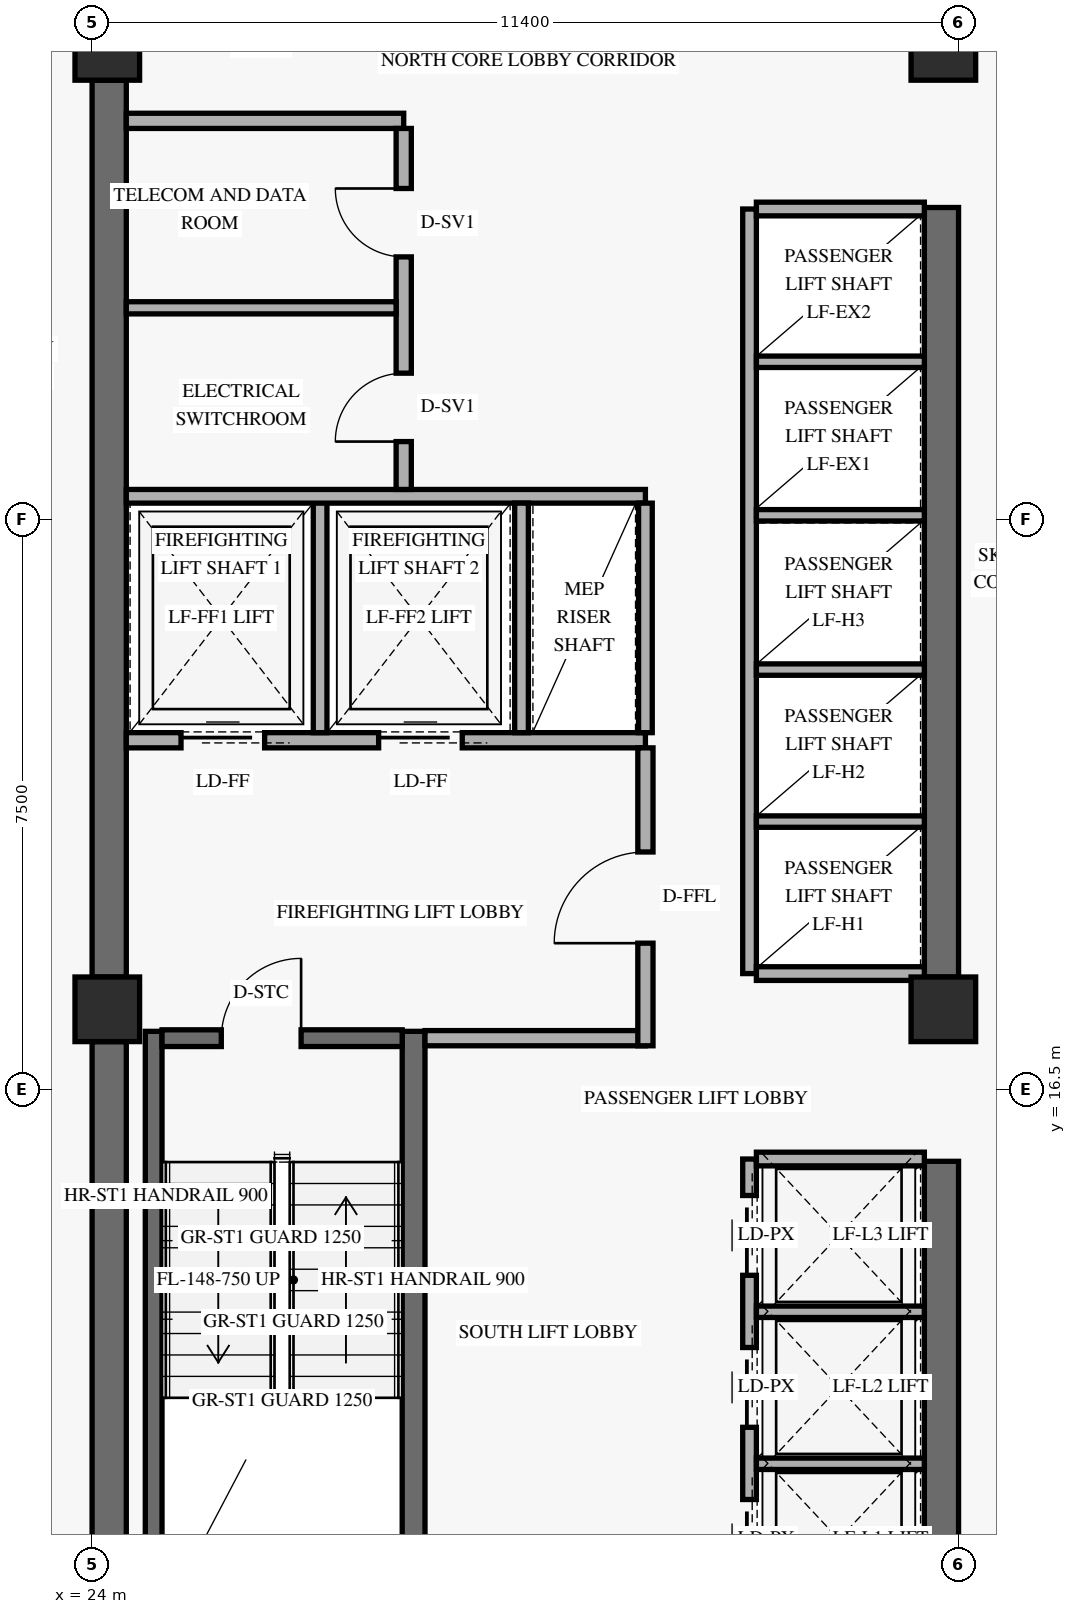
"""IFC4 building model, lengths in metres.
Left out: names, types, materials, properties, quantities, classifications, styles, units other than length and angle.
Written with IfcOpenShell. Run it as: python <this file> out.ifc"""

import sys

from ifc_helpers import new_model, si_unit, direction, frame, frame_2d, origin, origin_2d, place, context, subcontext, project, spatial, rectangle, extrude, element, fill, save


model = new_model("IFC4")
c1 = context("Model", 3, precision=1e-05, world=origin(), true_north=direction((0.0, 1.0)))
c2 = subcontext(c1, "Body", "Model", "MODEL_VIEW")
j1 = project(units=[si_unit("LENGTHUNIT", "METRE"), si_unit("PLANEANGLEUNIT", "RADIAN")], contexts=[c1])
p1 = place(None, origin())
s1 = spatial("IfcSite", under=j1, at=p1, CompositionType="ELEMENT")
p2 = place(p1, origin())
s2 = spatial("IfcBuilding", under=s1, at=p2, CompositionType="ELEMENT")
p3 = place(p2, frame((0.0, 0.0, 98.4)))
s3 = spatial("IfcBuildingStorey", under=s2, at=p3, CompositionType="ELEMENT", Elevation=98.4)
p4 = place(p3, frame((24.225, 9.675, 0.0), z_axis=(0.0, 0.0, 1.0), x_axis=(0.0, 1.0, 0.0)))
e1 = element("IfcWall", 1, at=p4, inside=s3, PredefinedType="SHEAR", context=c2, shape_type="SweptSolid", body=[
    extrude(rectangle(XDim=7.45, YDim=0.45, at=frame_2d((3.725, 0.0))), origin(), (0.0, 0.0, 1.0), 3.349),
])
p5 = place(p3, frame((24.225, 17.975, 0.0), z_axis=(0.0, 0.0, 1.0), x_axis=(0.0, 1.0, 0.0)))
e2 = element("IfcWall", 2, at=p5, inside=s3, PredefinedType="SHEAR", context=c2, shape_type="SweptSolid", body=[
    extrude(rectangle(XDim=11.8, YDim=0.45, at=frame_2d((5.9, 0.0))), origin(), (0.0, 0.0, 1.0), 3.349),
])
p6 = place(p3, frame((35.175, 9.675, 0.0), z_axis=(0.0, 0.0, 1.0), x_axis=(0.0, 1.0, 0.0)))
e3 = element("IfcWall", 3, at=p6, inside=s3, PredefinedType="SHEAR", context=c2, shape_type="SweptSolid", body=[
    extrude(rectangle(XDim=5.875, YDim=0.45, at=frame_2d((2.938, 0.0))), origin(), (0.0, 0.0, 1.0), 3.349),
])
p7 = place(p3, frame((35.175, 17.975, 0.0), z_axis=(0.0, 0.0, 1.0), x_axis=(0.0, 1.0, 0.0)))
e4 = element("IfcWall", 4, at=p7, inside=s3, PredefinedType="SHEAR", context=c2, shape_type="SweptSolid", body=[
    extrude(rectangle(XDim=10.125, YDim=0.45, at=frame_2d((5.062, 0.0))), origin(), (0.0, 0.0, 1.0), 3.349),
])
p8 = place(p3, frame((24.81, 9.5, 0.0), z_axis=(0.0, 0.0, 1.0), x_axis=(0.0, 1.0, 0.0)))
e5 = element("IfcWall", 5, at=p8, inside=s3, PredefinedType="SHEAR", context=c2, shape_type="SweptSolid", body=[
    extrude(rectangle(XDim=7.76, YDim=0.22, at=frame_2d((3.88, 0.0))), origin(), (0.0, 0.0, 1.0), 3.96),
])
p9 = place(p3, frame((28.23, 9.5, 0.0), z_axis=(0.0, 0.0, 1.0), x_axis=(0.0, 1.0, 0.0)))
e6 = element("IfcWall", 6, at=p9, inside=s3, PredefinedType="SHEAR", context=c2, shape_type="SweptSolid", body=[
    extrude(rectangle(XDim=7.76, YDim=0.3, at=frame_2d((3.88, 0.0))), origin(), (0.0, 0.0, 1.0), 3.96),
])
p10 = place(p3, frame((24.92, 17.17, 0.0), z_axis=(0.0, 0.0, 1.0), x_axis=(1.0, 0.0, 0.0)))
e7 = element("IfcWall", 7, at=p10, inside=s3, PredefinedType="SHEAR", context=c2, shape_type="SweptSolid", body=[
    extrude(rectangle(XDim=3.16, YDim=0.22, at=frame_2d((1.58, 0.0))), origin(), (0.0, 0.0, 1.0), 3.96),
])
p11 = place(p10, frame((0.78, 0.0, 0.0)))
e8 = element("IfcOpeningElement", 8, at=p11, cuts=e7, PredefinedType="OPENING", context=c2, shape_type="SweptSolid", body=[
    extrude(rectangle(XDim=1.05, YDim=2.15, at=frame_2d((0.525, 1.075))), frame((0.0, 0.12, 0.0), z_axis=(0.0, -1.0, 0.0), x_axis=(1.0, 0.0, 0.0)), (0.0, 0.0, 1.0), 0.24),
])
for number, where, z_axis, x_axis in (
    (9, (24.2, 17.55, 0.0), (0.0, 0.0, 1.0), (1.0, 0.0, 0.0)),
    (10, (24.2, 30.2, 0.0), (0.0, 0.0, 1.0), (1.0, 0.0, 0.0)),
    (11, (35.2, 17.55, 0.0), (0.0, 0.0, 1.0), (1.0, 0.0, 0.0)),
    (12, (35.2, 30.2, 0.0), (0.0, 0.0, 1.0), (1.0, 0.0, 0.0)),
):
    element("IfcColumn", number, at=place(p3, frame(where, z_axis=z_axis, x_axis=x_axis)), inside=s3, PredefinedType="COLUMN", context=c2, shape_type="SweptSolid", body=[
        extrude(rectangle(XDim=0.85, YDim=0.85, at=origin_2d()), origin(), (0.0, 0.0, 1.0), 4.2),
    ])
p12 = place(p3, frame((24.45, 21.09, 0.0), z_axis=(0.0, 0.0, 1.0), x_axis=(1.0, 0.0, 0.0)))
e13 = element("IfcWall", 13, at=p12, inside=s3, PredefinedType="STANDARD", context=c2, shape_type="SweptSolid", body=[
    extrude(rectangle(XDim=6.83, YDim=0.2, at=frame_2d((3.415, 0.0))), origin(), (0.0, 0.0, 1.0), 3.96),
])
p13 = place(p12, frame((0.72, 0.0, 0.0)))
e14 = element("IfcOpeningElement", 14, at=p13, cuts=e13, PredefinedType="OPENING", context=c2, shape_type="SweptSolid", body=[
    extrude(rectangle(XDim=1.1, YDim=2.2, at=frame_2d((0.55, 1.1))), frame((0.0, 0.11, 0.0), z_axis=(0.0, -1.0, 0.0), x_axis=(1.0, 0.0, 0.0)), (0.0, 0.0, 1.0), 0.22),
])
p14 = place(p12, frame((3.32, 0.0, 0.0)))
e15 = element("IfcOpeningElement", 15, at=p14, cuts=e13, PredefinedType="OPENING", context=c2, shape_type="SweptSolid", body=[
    extrude(rectangle(XDim=1.1, YDim=2.2, at=frame_2d((0.55, 1.1))), frame((0.0, 0.11, 0.0), z_axis=(0.0, -1.0, 0.0), x_axis=(1.0, 0.0, 0.0)), (0.0, 0.0, 1.0), 0.22),
])
p15 = place(p3, frame((28.38, 17.17, 0.0), z_axis=(0.0, 0.0, 1.0), x_axis=(1.0, 0.0, 0.0)))
e16 = element("IfcWall", 16, at=p15, inside=s3, PredefinedType="STANDARD", context=c2, shape_type="SweptSolid", body=[
    extrude(rectangle(XDim=2.9, YDim=0.2, at=frame_2d((1.45, 0.0))), origin(), (0.0, 0.0, 1.0), 3.96),
])
p16 = place(p3, frame((31.28, 17.07, 0.0), z_axis=(0.0, 0.0, 1.0), x_axis=(0.0, 1.0, 0.0)))
e17 = element("IfcWall", 17, at=p16, inside=s3, PredefinedType="STANDARD", context=c2, shape_type="SweptSolid", body=[
    extrude(rectangle(XDim=3.92, YDim=0.2, at=frame_2d((1.96, 0.0))), origin(), (0.0, 0.0, 1.0), 3.331),
])
p17 = place(p16, frame((1.35, 0.0, 0.0)))
e18 = element("IfcOpeningElement", 18, at=p17, cuts=e17, PredefinedType="OPENING", context=c2, shape_type="SweptSolid", body=[
    extrude(rectangle(XDim=1.2, YDim=2.15, at=frame_2d((0.6, 1.075))), frame((0.0, 0.11, 0.0), z_axis=(0.0, -1.0, 0.0), x_axis=(1.0, 0.0, 0.0)), (0.0, 0.0, 1.0), 0.22),
])
p18 = place(p3, frame((27.0, 21.19, 0.0), z_axis=(0.0, 0.0, 1.0), x_axis=(0.0, 1.0, 0.0)))
e19 = element("IfcWall", 19, at=p18, inside=s3, PredefinedType="STANDARD", context=c2, shape_type="SweptSolid", body=[
    extrude(rectangle(XDim=3.11, YDim=0.18, at=frame_2d((1.555, 0.0))), origin(), (0.0, 0.0, 1.0), 3.96),
])
p19 = place(p3, frame((24.45, 24.3, 0.0), z_axis=(0.0, 0.0, 1.0), x_axis=(1.0, 0.0, 0.0)))
e20 = element("IfcWall", 20, at=p19, inside=s3, PredefinedType="STANDARD", context=c2, shape_type="SweptSolid", body=[
    extrude(rectangle(XDim=6.83, YDim=0.18, at=frame_2d((3.415, 0.0))), origin(), (0.0, 0.0, 1.0), 3.96),
])
for number, where, z_axis, x_axis in (
    (21, (29.65, 21.19, 0.0), (0.0, 0.0, 1.0), (0.0, 1.0, 0.0)),
    (22, (31.28, 21.19, 0.0), (0.0, 0.0, 1.0), (0.0, 1.0, 0.0)),
):
    element("IfcWall", number, at=place(p3, frame(where, z_axis=z_axis, x_axis=x_axis)), inside=s3, PredefinedType="STANDARD", context=c2, shape_type="SweptSolid", body=[
        extrude(rectangle(XDim=3.02, YDim=0.18, at=frame_2d((1.51, 0.0))), origin(), (0.0, 0.0, 1.0), 3.96),
    ])
p20 = place(p3, frame((24.45, 29.24, 0.0), z_axis=(0.0, 0.0, 1.0), x_axis=(1.0, 0.0, 0.0)))
e23 = element("IfcWall", 23, at=p20, inside=s3, PredefinedType="STANDARD", context=c2, shape_type="SweptSolid", body=[
    extrude(rectangle(XDim=3.65, YDim=0.2, at=frame_2d((1.825, 0.0))), origin(), (0.0, 0.0, 1.0), 3.96),
])
p21 = place(p3, frame((28.1, 24.39, 0.0), z_axis=(0.0, 0.0, 1.0), x_axis=(0.0, 1.0, 0.0)))
e24 = element("IfcWall", 24, at=p21, inside=s3, PredefinedType="STANDARD", context=c2, shape_type="SweptSolid", body=[
    extrude(rectangle(XDim=4.75, YDim=0.2, at=frame_2d((2.375, 0.0))), origin(), (0.0, 0.0, 1.0), 3.96),
])
p22 = place(p21, frame((0.63, 0.0, 0.0)))
e25 = element("IfcOpeningElement", 25, at=p22, cuts=e24, PredefinedType="OPENING", context=c2, shape_type="SweptSolid", body=[
    extrude(rectangle(XDim=0.9, YDim=2.1, at=frame_2d((0.45, 1.05))), frame((0.0, 0.11, 0.0), z_axis=(0.0, -1.0, 0.0), x_axis=(1.0, 0.0, 0.0)), (0.0, 0.0, 1.0), 0.22),
])
p23 = place(p21, frame((3.06, 0.0, 0.0)))
e26 = element("IfcOpeningElement", 26, at=p23, cuts=e24, PredefinedType="OPENING", context=c2, shape_type="SweptSolid", body=[
    extrude(rectangle(XDim=0.9, YDim=2.1, at=frame_2d((0.45, 1.05))), frame((0.0, 0.11, 0.0), z_axis=(0.0, -1.0, 0.0), x_axis=(1.0, 0.0, 0.0)), (0.0, 0.0, 1.0), 0.22),
])
p24 = place(p3, frame((24.45, 26.78, 0.0), z_axis=(0.0, 0.0, 1.0), x_axis=(1.0, 0.0, 0.0)))
e27 = element("IfcWall", 27, at=p24, inside=s3, PredefinedType="PARTITIONING", context=c2, shape_type="SweptSolid", body=[
    extrude(rectangle(XDim=3.55, YDim=0.16, at=frame_2d((1.775, 0.0))), origin(), (0.0, 0.0, 1.0), 3.96),
])
p25 = place(p3, frame((32.65, 9.5, 0.0), z_axis=(0.0, 0.0, 1.0), x_axis=(0.0, 1.0, 0.0)))
e28 = element("IfcWall", 28, at=p25, inside=s3, PredefinedType="STANDARD", context=c2, shape_type="SweptSolid", body=[
    extrude(rectangle(XDim=6.08, YDim=0.18, at=frame_2d((3.04, 0.0))), origin(), (0.0, 0.0, 1.0), 3.96),
])
p26 = place(p25, frame((0.55, 0.0, 0.0)))
e29 = element("IfcOpeningElement", 29, at=p26, cuts=e28, PredefinedType="OPENING", context=c2, shape_type="SweptSolid", body=[
    extrude(rectangle(XDim=1.05, YDim=2.2, at=frame_2d((0.525, 1.1))), frame((0.0, 0.1, 0.0), z_axis=(0.0, -1.0, 0.0), x_axis=(1.0, 0.0, 0.0)), (0.0, 0.0, 1.0), 0.2),
])
p27 = place(p25, frame((2.55, 0.0, 0.0)))
e30 = element("IfcOpeningElement", 30, at=p27, cuts=e28, PredefinedType="OPENING", context=c2, shape_type="SweptSolid", body=[
    extrude(rectangle(XDim=1.05, YDim=2.2, at=frame_2d((0.525, 1.1))), frame((0.0, 0.1, 0.0), z_axis=(0.0, -1.0, 0.0), x_axis=(1.0, 0.0, 0.0)), (0.0, 0.0, 1.0), 0.2),
])
p28 = place(p25, frame((4.55, 0.0, 0.0)))
e31 = element("IfcOpeningElement", 31, at=p28, cuts=e28, PredefinedType="OPENING", context=c2, shape_type="SweptSolid", body=[
    extrude(rectangle(XDim=1.05, YDim=2.2, at=frame_2d((0.525, 1.1))), frame((0.0, 0.1, 0.0), z_axis=(0.0, -1.0, 0.0), x_axis=(1.0, 0.0, 0.0)), (0.0, 0.0, 1.0), 0.2),
])
p29 = place(p3, frame((32.74, 15.58, 0.0), z_axis=(0.0, 0.0, 1.0), x_axis=(1.0, 0.0, 0.0)))
e32 = element("IfcWall", 32, at=p29, inside=s3, PredefinedType="STANDARD", context=c2, shape_type="SweptSolid", body=[
    extrude(rectangle(XDim=2.21, YDim=0.18, at=frame_2d((1.105, 0.0))), origin(), (0.0, 0.0, 1.0), 3.96),
])
for number, where, z_axis, x_axis in (
    (33, (32.74, 11.57, 0.0), (0.0, 0.0, 1.0), (1.0, 0.0, 0.0)),
    (34, (32.74, 13.57, 0.0), (0.0, 0.0, 1.0), (1.0, 0.0, 0.0)),
):
    element("IfcWall", number, at=place(p3, frame(where, z_axis=z_axis, x_axis=x_axis)), inside=s3, PredefinedType="STANDARD", context=c2, shape_type="SweptSolid", body=[
        extrude(rectangle(XDim=2.21, YDim=0.15, at=frame_2d((1.105, 0.0))), origin(), (0.0, 0.0, 1.0), 3.96),
    ])
p30 = place(p3, frame((32.65, 18.02, 0.0), z_axis=(0.0, 0.0, 1.0), x_axis=(0.0, 1.0, 0.0)))
e35 = element("IfcWall", 35, at=p30, inside=s3, PredefinedType="STANDARD", context=c2, shape_type="SweptSolid", body=[
    extrude(rectangle(XDim=10.06, YDim=0.18, at=frame_2d((5.03, 0.0))), origin(), (0.0, 0.0, 1.0), 3.96),
])
for number, where, z_axis, x_axis in (
    (36, (32.74, 18.02, 0.0), (0.0, 0.0, 1.0), (1.0, 0.0, 0.0)),
    (37, (32.74, 28.08, 0.0), (0.0, 0.0, 1.0), (1.0, 0.0, 0.0)),
):
    element("IfcWall", number, at=place(p3, frame(where, z_axis=z_axis, x_axis=x_axis)), inside=s3, PredefinedType="STANDARD", context=c2, shape_type="SweptSolid", body=[
        extrude(rectangle(XDim=2.21, YDim=0.18, at=frame_2d((1.105, 0.0))), origin(), (0.0, 0.0, 1.0), 3.96),
    ])
for number, where, z_axis, x_axis in (
    (38, (32.74, 20.02, 0.0), (0.0, 0.0, 1.0), (1.0, 0.0, 0.0)),
    (39, (32.74, 22.02, 0.0), (0.0, 0.0, 1.0), (1.0, 0.0, 0.0)),
    (40, (32.74, 24.05, 0.0), (0.0, 0.0, 1.0), (1.0, 0.0, 0.0)),
    (41, (32.74, 26.07, 0.0), (0.0, 0.0, 1.0), (1.0, 0.0, 0.0)),
):
    element("IfcWall", number, at=place(p3, frame(where, z_axis=z_axis, x_axis=x_axis)), inside=s3, PredefinedType="STANDARD", context=c2, shape_type="SweptSolid", body=[
        extrude(rectangle(XDim=2.21, YDim=0.15, at=frame_2d((1.105, 0.0))), origin(), (0.0, 0.0, 1.0), 3.96),
    ])
p31 = place(p11, frame((1.05, 0.0, 0.0), z_axis=(0.0, 0.0, 1.0), x_axis=(-1.0, 0.0, 0.0)))
e42 = element("IfcDoor", 42, at=p31, inside=s3, OperationType="SINGLE_SWING_LEFT", PredefinedType="DOOR", context=c2, shape_type="SweptSolid", body=[
    extrude(rectangle(XDim=1.05, YDim=2.15, at=frame_2d((0.525, 1.075))), frame((0.0, 0.025, 0.0), z_axis=(0.0, -1.0, 0.0), x_axis=(1.0, 0.0, 0.0)), (0.0, 0.0, 1.0), 0.05),
])
fill(e8, e42)
p32 = place(p13, origin())
e43 = element("IfcDoor", 43, at=p32, inside=s3, OperationType="SLIDING_TO_LEFT", PredefinedType="DOOR", context=c2, shape_type="SweptSolid", body=[
    extrude(rectangle(XDim=1.1, YDim=2.2, at=frame_2d((0.55, 1.1))), frame((0.0, 0.025, 0.0), z_axis=(0.0, -1.0, 0.0), x_axis=(1.0, 0.0, 0.0)), (0.0, 0.0, 1.0), 0.05),
])
fill(e14, e43)
p33 = place(p14, origin())
e44 = element("IfcDoor", 44, at=p33, inside=s3, OperationType="SLIDING_TO_LEFT", PredefinedType="DOOR", context=c2, shape_type="SweptSolid", body=[
    extrude(rectangle(XDim=1.1, YDim=2.2, at=frame_2d((0.55, 1.1))), frame((0.0, 0.025, 0.0), z_axis=(0.0, -1.0, 0.0), x_axis=(1.0, 0.0, 0.0)), (0.0, 0.0, 1.0), 0.05),
])
fill(e15, e44)
p34 = place(p17, origin())
e45 = element("IfcDoor", 45, at=p34, inside=s3, OperationType="SINGLE_SWING_LEFT", PredefinedType="DOOR", context=c2, shape_type="SweptSolid", body=[
    extrude(rectangle(XDim=1.2, YDim=2.15, at=frame_2d((0.6, 1.075))), frame((0.0, 0.025, 0.0), z_axis=(0.0, -1.0, 0.0), x_axis=(1.0, 0.0, 0.0)), (0.0, 0.0, 1.0), 0.05),
])
fill(e18, e45)
p35 = place(p22, origin())
e46 = element("IfcDoor", 46, at=p35, inside=s3, OperationType="SINGLE_SWING_LEFT", PredefinedType="DOOR", context=c2, shape_type="SweptSolid", body=[
    extrude(rectangle(XDim=0.9, YDim=2.1, at=frame_2d((0.45, 1.05))), frame((0.0, 0.025, 0.0), z_axis=(0.0, -1.0, 0.0), x_axis=(1.0, 0.0, 0.0)), (0.0, 0.0, 1.0), 0.05),
])
fill(e25, e46)
p36 = place(p23, origin())
e47 = element("IfcDoor", 47, at=p36, inside=s3, OperationType="SINGLE_SWING_RIGHT", PredefinedType="DOOR", context=c2, shape_type="SweptSolid", body=[
    extrude(rectangle(XDim=0.9, YDim=2.1, at=frame_2d((0.45, 1.05))), frame((0.0, 0.025, 0.0), z_axis=(0.0, -1.0, 0.0), x_axis=(1.0, 0.0, 0.0)), (0.0, 0.0, 1.0), 0.05),
])
fill(e26, e47)
p37 = place(p26, origin())
e48 = element("IfcDoor", 48, at=p37, inside=s3, OperationType="SLIDING_TO_LEFT", PredefinedType="DOOR", context=c2, shape_type="SweptSolid", body=[
    extrude(rectangle(XDim=1.05, YDim=2.2, at=frame_2d((0.525, 1.1))), frame((0.0, 0.025, 0.0), z_axis=(0.0, -1.0, 0.0), x_axis=(1.0, 0.0, 0.0)), (0.0, 0.0, 1.0), 0.05),
])
fill(e29, e48)
p38 = place(p27, origin())
e49 = element("IfcDoor", 49, at=p38, inside=s3, OperationType="SLIDING_TO_LEFT", PredefinedType="DOOR", context=c2, shape_type="SweptSolid", body=[
    extrude(rectangle(XDim=1.05, YDim=2.2, at=frame_2d((0.525, 1.1))), frame((0.0, 0.025, 0.0), z_axis=(0.0, -1.0, 0.0), x_axis=(1.0, 0.0, 0.0)), (0.0, 0.0, 1.0), 0.05),
])
fill(e30, e49)
p39 = place(p28, origin())
e50 = element("IfcDoor", 50, at=p39, inside=s3, OperationType="SLIDING_TO_LEFT", PredefinedType="DOOR", context=c2, shape_type="SweptSolid", body=[
    extrude(rectangle(XDim=1.05, YDim=2.2, at=frame_2d((0.525, 1.1))), frame((0.0, 0.025, 0.0), z_axis=(0.0, -1.0, 0.0), x_axis=(1.0, 0.0, 0.0)), (0.0, 0.0, 1.0), 0.05),
])
fill(e31, e50)
save(model, sys.argv[1])
